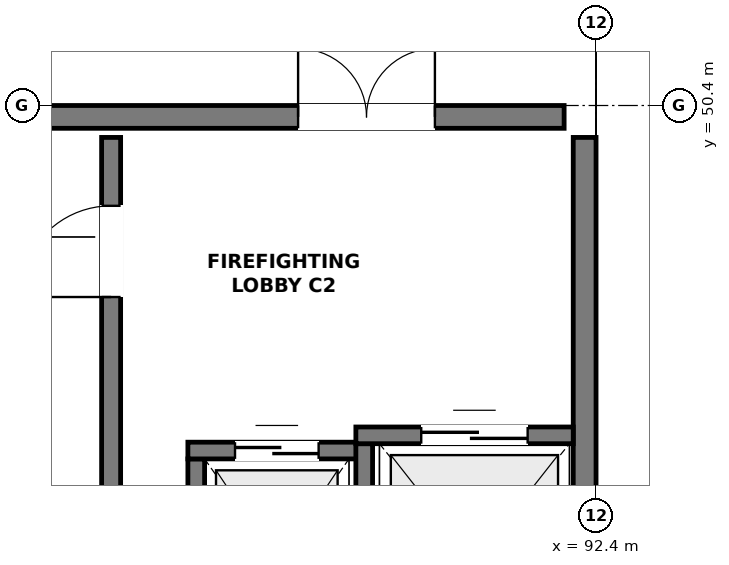
"""IFC4 building model, lengths in metres.
Left out: names, types, materials, properties, quantities, classifications, styles, units other than length and angle.
Written with IfcOpenShell. Run it as: python <this file> out.ifc"""

import sys

from ifc_helpers import new_model, si_unit, direction, frame, frame_2d, origin, place, context, subcontext, project, spatial, rectangle, extrude, element, fill, save


model = new_model("IFC4")
c1 = context("Model", 3, precision=1e-05, world=origin(), true_north=direction((0.0, 1.0)))
c2 = subcontext(c1, "Body", "Model", "MODEL_VIEW")
j1 = project(units=[si_unit("LENGTHUNIT", "METRE"), si_unit("PLANEANGLEUNIT", "RADIAN")], contexts=[c1])
p1 = place(None, origin())
s1 = spatial("IfcSite", under=j1, at=p1, CompositionType="ELEMENT")
p2 = place(p1, origin())
s2 = spatial("IfcBuilding", under=s1, at=p2, CompositionType="ELEMENT")
p3 = place(p2, frame((0.0, 0.0, 9.9)))
s3 = spatial("IfcBuildingStorey", under=s2, at=p3, CompositionType="ELEMENT", Elevation=9.9)
p4 = place(p3, frame((76.02, 50.25, 0.0), z_axis=(0.0, 0.0, 1.0), x_axis=(1.0, 0.0, 0.0)))
e1 = element("IfcWall", 1, at=p4, inside=s3, PredefinedType="SHEAR", context=c2, shape_type="SweptSolid", body=[
    extrude(rectangle(XDim=15.96, YDim=0.3, at=frame_2d((7.98, 0.0))), origin(), (0.0, 0.0, 1.0), 4.22),
])
p5 = place(p4, frame((12.46, 0.0, 0.0)))
e2 = element("IfcOpeningElement", 2, at=p5, cuts=e1, PredefinedType="OPENING", context=c2, shape_type="SweptSolid", body=[
    extrude(rectangle(XDim=1.8, YDim=2.2, at=frame_2d((0.9, 1.1))), frame((0.0, 0.162, 0.0), z_axis=(0.0, -1.0, 0.0), x_axis=(1.0, 0.0, 0.0)), (0.0, 0.0, 1.0), 0.324),
])
p6 = place(p3, frame((92.25, 42.42, 0.0), z_axis=(0.0, 0.0, 1.0), x_axis=(0.0, 1.0, 0.0)))
e3 = element("IfcWall", 3, at=p6, inside=s3, PredefinedType="SHEAR", context=c2, shape_type="SweptSolid", body=[
    extrude(rectangle(XDim=7.56, YDim=0.3, at=frame_2d((3.78, 0.0))), origin(), (0.0, 0.0, 1.0), 4.22),
])
p7 = place(p3, frame((86.02, 42.42, 0.0), z_axis=(0.0, 0.0, 1.0), x_axis=(0.0, 1.0, 0.0)))
e4 = element("IfcWall", 4, at=p7, inside=s3, PredefinedType="SHEAR", context=c2, shape_type="SweptSolid", body=[
    extrude(rectangle(XDim=7.56, YDim=0.25, at=frame_2d((3.78, 0.0))), origin(), (0.0, 0.0, 1.0), 4.22),
])
p8 = place(p7, frame((5.46, 0.0, 0.0)))
e5 = element("IfcOpeningElement", 5, at=p8, cuts=e4, PredefinedType="OPENING", context=c2, shape_type="SweptSolid", body=[
    extrude(rectangle(XDim=1.2, YDim=2.2, at=frame_2d((0.6, 1.1))), frame((0.0, 0.137, 0.0), z_axis=(0.0, -1.0, 0.0), x_axis=(1.0, 0.0, 0.0)), (0.0, 0.0, 1.0), 0.274),
])
p9 = place(p3, frame((87.14, 43.05, 0.0), z_axis=(0.0, 0.0, 1.0), x_axis=(0.0, 1.0, 0.0)))
e6 = element("IfcWall", 6, at=p9, inside=s3, PredefinedType="SOLIDWALL", context=c2, shape_type="SweptSolid", body=[
    extrude(rectangle(XDim=2.7, YDim=0.22, at=frame_2d((1.35, 0.0))), origin(), (0.0, 0.0, 1.0), 4.22),
])
p10 = place(p3, frame((87.03, 45.86, 0.0), z_axis=(0.0, 0.0, 1.0), x_axis=(1.0, 0.0, 0.0)))
e7 = element("IfcWall", 7, at=p10, inside=s3, PredefinedType="SOLIDWALL", context=c2, shape_type="SweptSolid", body=[
    extrude(rectangle(XDim=2.43, YDim=0.22, at=frame_2d((1.215, 0.0))), origin(), (0.0, 0.0, 1.0), 4.22),
])
p11 = place(p10, frame((0.62, 0.0, 0.0)))
e8 = element("IfcOpeningElement", 8, at=p11, cuts=e7, PredefinedType="OPENING", context=c2, shape_type="SweptSolid", body=[
    extrude(rectangle(XDim=1.1, YDim=2.15, at=frame_2d((0.55, 1.075))), frame((0.0, 0.122, 0.0), z_axis=(0.0, -1.0, 0.0), x_axis=(1.0, 0.0, 0.0)), (0.0, 0.0, 1.0), 0.244),
])
p12 = place(p3, frame((89.35, 42.85, 0.0), z_axis=(0.0, 0.0, 1.0), x_axis=(0.0, 1.0, 0.0)))
e9 = element("IfcWall", 9, at=p12, inside=s3, PredefinedType="SOLIDWALL", context=c2, shape_type="SweptSolid", body=[
    extrude(rectangle(XDim=3.1, YDim=0.22, at=frame_2d((1.55, 0.0))), origin(), (0.0, 0.0, 1.0), 4.22),
])
p13 = place(p3, frame((89.24, 46.06, 0.0), z_axis=(0.0, 0.0, 1.0), x_axis=(1.0, 0.0, 0.0)))
e10 = element("IfcWall", 10, at=p13, inside=s3, PredefinedType="SOLIDWALL", context=c2, shape_type="SweptSolid", body=[
    extrude(rectangle(XDim=2.86, YDim=0.22, at=frame_2d((1.43, 0.0))), origin(), (0.0, 0.0, 1.0), 4.22),
])
p14 = place(p13, frame((0.86, 0.0, 0.0)))
e11 = element("IfcOpeningElement", 11, at=p14, cuts=e10, PredefinedType="OPENING", context=c2, shape_type="SweptSolid", body=[
    extrude(rectangle(XDim=1.4, YDim=2.2, at=frame_2d((0.7, 1.1))), frame((0.0, 0.122, 0.0), z_axis=(0.0, -1.0, 0.0), x_axis=(1.0, 0.0, 0.0)), (0.0, 0.0, 1.0), 0.244),
])
p15 = place(p5, origin())
e12 = element("IfcDoor", 12, at=p15, inside=s3, OperationType="DOUBLE_DOOR_SINGLE_SWING", PredefinedType="DOOR", context=c2, shape_type="SweptSolid", body=[
    extrude(rectangle(XDim=1.8, YDim=2.2, at=frame_2d((0.9, 1.1))), frame((0.0, 0.025, 0.0), z_axis=(0.0, -1.0, 0.0), x_axis=(1.0, 0.0, 0.0)), (0.0, 0.0, 1.0), 0.05),
])
fill(e2, e12)
p16 = place(p8, origin())
e13 = element("IfcDoor", 13, at=p16, inside=s3, OperationType="SINGLE_SWING_LEFT", PredefinedType="DOOR", context=c2, shape_type="SweptSolid", body=[
    extrude(rectangle(XDim=1.2, YDim=2.2, at=frame_2d((0.6, 1.1))), frame((0.0, 0.025, 0.0), z_axis=(0.0, -1.0, 0.0), x_axis=(1.0, 0.0, 0.0)), (0.0, 0.0, 1.0), 0.05),
])
fill(e5, e13)
p17 = place(p11, origin())
e14 = element("IfcDoor", 14, at=p17, inside=s3, OperationType="DOUBLE_DOOR_SLIDING", PredefinedType="DOOR", context=c2, shape_type="SweptSolid", body=[
    extrude(rectangle(XDim=1.1, YDim=2.15, at=frame_2d((0.55, 1.075))), frame((0.0, 0.025, 0.0), z_axis=(0.0, -1.0, 0.0), x_axis=(1.0, 0.0, 0.0)), (0.0, 0.0, 1.0), 0.05),
])
fill(e8, e14)
p18 = place(p14, origin())
e15 = element("IfcDoor", 15, at=p18, inside=s3, OperationType="DOUBLE_DOOR_SLIDING", PredefinedType="DOOR", context=c2, shape_type="SweptSolid", body=[
    extrude(rectangle(XDim=1.4, YDim=2.2, at=frame_2d((0.7, 1.1))), frame((0.0, 0.025, 0.0), z_axis=(0.0, -1.0, 0.0), x_axis=(1.0, 0.0, 0.0)), (0.0, 0.0, 1.0), 0.05),
])
fill(e11, e15)
save(model, sys.argv[1])
